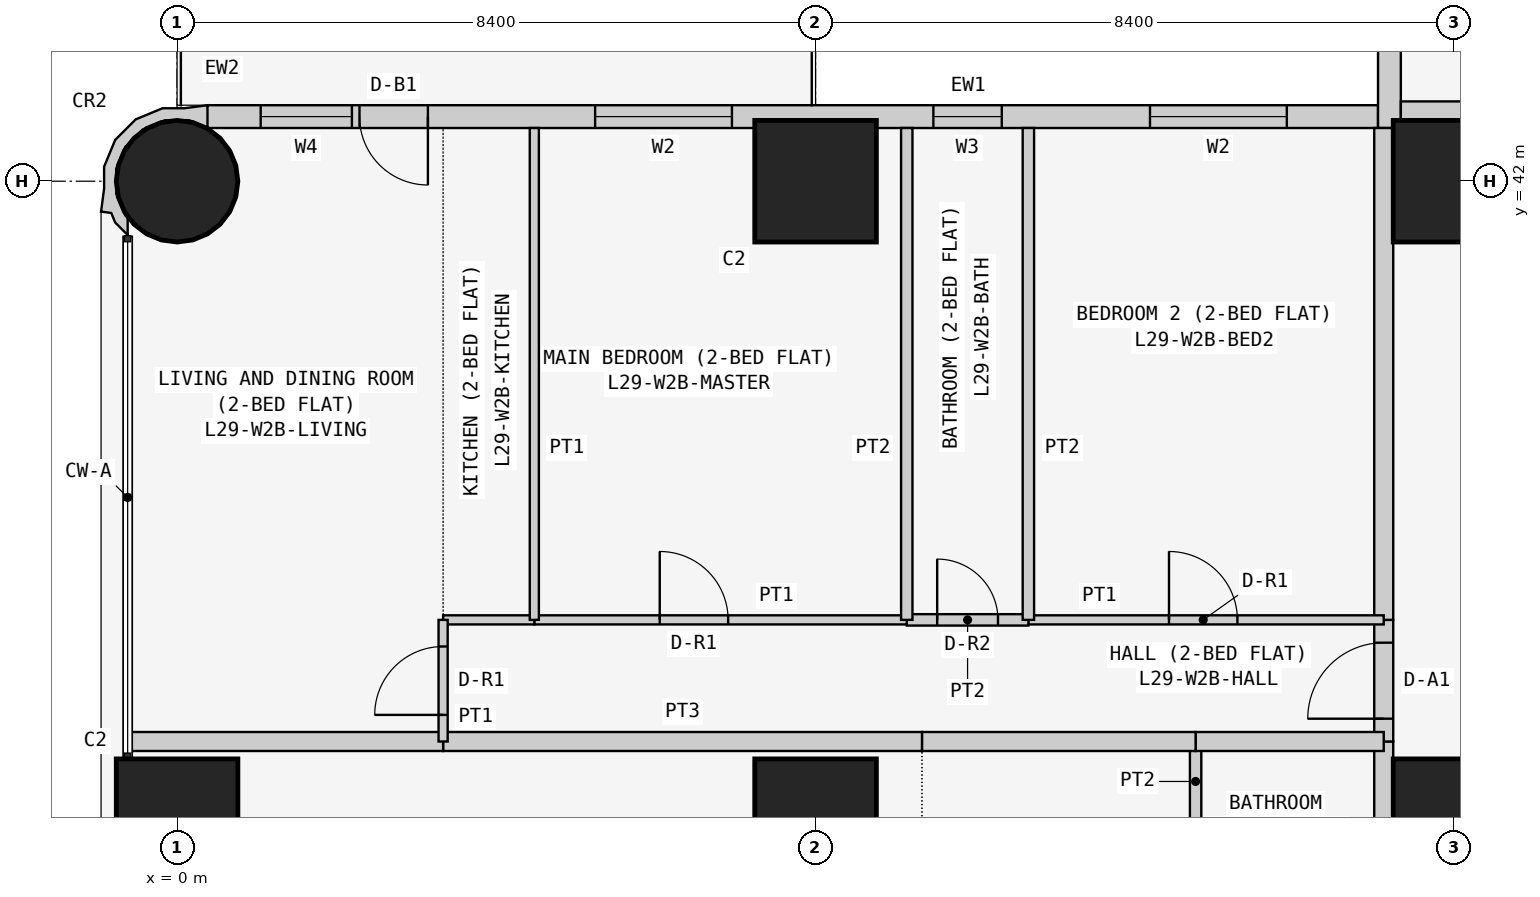
"""IFC4 building model, lengths in metres.
Left out: names, types, materials, properties, quantities, classifications, styles, units other than length and angle.
Written with IfcOpenShell. Run it as: python <this file> out.ifc"""

import sys

from ifc_helpers import new_model, si_unit, direction, frame, frame_2d, origin, origin_2d, place, context, subcontext, project, spatial, polyline, rectangle, circle, outline, extrude, element, fill, save


model = new_model("IFC4")
c1 = context("Model", 3, precision=1e-05, world=origin(), true_north=direction((0.0, 1.0)))
c2 = subcontext(c1, "Body", "Model", "MODEL_VIEW")
j1 = project(units=[si_unit("LENGTHUNIT", "METRE"), si_unit("PLANEANGLEUNIT", "RADIAN")], contexts=[c1])
p1 = place(None, origin())
s1 = spatial("IfcSite", under=j1, at=p1, CompositionType="ELEMENT")
p2 = place(p1, origin())
s2 = spatial("IfcBuilding", under=s1, at=p2, CompositionType="ELEMENT")
p3 = place(p2, frame((0.0, 0.0, 116.1)))
s3 = spatial("IfcBuildingStorey", under=s2, at=p3, CompositionType="ELEMENT", Elevation=116.1)
p4 = place(p3, frame((0.0, 33.6, 0.0), z_axis=(0.0, 0.0, 1.0), x_axis=(1.0, 0.0, 0.0)))
e1 = element("IfcColumn", 1, at=p4, inside=s3, PredefinedType="COLUMN", context=c2, shape_type="SweptSolid", body=[
    extrude(rectangle(XDim=1.6, YDim=1.6, at=origin_2d()), origin(), (0.0, 0.0, 1.0), 3.6),
])
p5 = place(p3, frame((0.0, 42.0, 0.0), z_axis=(0.0, 0.0, 1.0), x_axis=(1.0, 0.0, 0.0)))
e2 = element("IfcColumn", 2, at=p5, inside=s3, PredefinedType="COLUMN", context=c2, shape_type="SweptSolid", body=[
    extrude(circle(Radius=0.8, at=origin_2d()), origin(), (0.0, 0.0, 1.0), 3.6),
])
for number, where, z_axis, x_axis in (
    (3, (8.4, 33.6, 0.0), (0.0, 0.0, 1.0), (1.0, 0.0, 0.0)),
    (4, (8.4, 42.0, 0.0), (0.0, 0.0, 1.0), (1.0, 0.0, 0.0)),
    (5, (16.8, 33.6, 0.0), (0.0, 0.0, 1.0), (1.0, 0.0, 0.0)),
    (6, (16.8, 42.0, 0.0), (0.0, 0.0, 1.0), (1.0, 0.0, 0.0)),
):
    element("IfcColumn", number, at=place(p3, frame(where, z_axis=z_axis, x_axis=x_axis)), inside=s3, PredefinedType="COLUMN", context=c2, shape_type="SweptSolid", body=[
        extrude(rectangle(XDim=1.6, YDim=1.6, at=origin_2d()), origin(), (0.0, 0.0, 1.0), 3.6),
    ])
p6 = place(p3, frame((15.8, 42.85, 0.0), z_axis=(0.0, 0.0, 1.0), x_axis=(-1.0, 0.0, 0.0)))
e7 = element("IfcWall", 7, at=p6, inside=s3, PredefinedType="SOLIDWALL", context=c2, shape_type="SweptSolid", body=[
    extrude(rectangle(XDim=15.4, YDim=0.3, at=frame_2d((7.7, 0.0))), origin(), (0.0, 0.0, 1.0), 3.45),
])
p7 = place(p6, frame((1.2, 0.0, 0.9)))
e8 = element("IfcOpeningElement", 8, at=p7, cuts=e7, PredefinedType="OPENING", context=c2, shape_type="SweptSolid", body=[
    extrude(rectangle(XDim=1.8, YDim=1.5, at=frame_2d((0.9, 0.75))), frame((0.0, 0.16, 0.0), z_axis=(0.0, -1.0, 0.0), x_axis=(1.0, 0.0, 0.0)), (0.0, 0.0, 1.0), 0.32),
])
p8 = place(p6, frame((4.95, 0.0, 1.5)))
e9 = element("IfcOpeningElement", 9, at=p8, cuts=e7, PredefinedType="OPENING", context=c2, shape_type="SweptSolid", body=[
    extrude(rectangle(XDim=0.9, YDim=0.7, at=frame_2d((0.45, 0.35))), frame((0.0, 0.16, 0.0), z_axis=(0.0, -1.0, 0.0), x_axis=(1.0, 0.0, 0.0)), (0.0, 0.0, 1.0), 0.32),
])
p9 = place(p6, frame((8.5, 0.0, 0.9)))
e10 = element("IfcOpeningElement", 10, at=p9, cuts=e7, PredefinedType="OPENING", context=c2, shape_type="SweptSolid", body=[
    extrude(rectangle(XDim=1.8, YDim=1.5, at=frame_2d((0.9, 0.75))), frame((0.0, 0.16, 0.0), z_axis=(0.0, -1.0, 0.0), x_axis=(1.0, 0.0, 0.0)), (0.0, 0.0, 1.0), 0.32),
])
p10 = place(p6, frame((12.5, 0.0, 0.0)))
e11 = element("IfcOpeningElement", 11, at=p10, cuts=e7, PredefinedType="OPENING", context=c2, shape_type="SweptSolid", body=[
    extrude(rectangle(XDim=0.9, YDim=2.4, at=frame_2d((0.45, 1.2))), frame((0.0, 0.16, 0.0), z_axis=(0.0, -1.0, 0.0), x_axis=(1.0, 0.0, 0.0)), (0.0, 0.0, 1.0), 0.32),
])
p11 = place(p6, frame((13.5, 0.0, 0.9)))
e12 = element("IfcOpeningElement", 12, at=p11, cuts=e7, PredefinedType="OPENING", context=c2, shape_type="SweptSolid", body=[
    extrude(rectangle(XDim=1.2, YDim=1.5, at=frame_2d((0.6, 0.75))), frame((0.0, 0.16, 0.0), z_axis=(0.0, -1.0, 0.0), x_axis=(1.0, 0.0, 0.0)), (0.0, 0.0, 1.0), 0.32),
])
p12 = place(p3, frame((15.95, 50.0, 0.0), z_axis=(0.0, 0.0, 1.0), x_axis=(0.0, -1.0, 0.0)))
e13 = element("IfcWall", 13, at=p12, inside=s3, PredefinedType="SOLIDWALL", context=c2, shape_type="SweptSolid", body=[
    extrude(rectangle(XDim=7.3, YDim=0.3, at=frame_2d((3.65, 0.0))), origin(), (0.0, 0.0, 1.0), 3.45),
])
p13 = place(p12, frame((3.1, 0.0, 0.9)))
e14 = element("IfcOpeningElement", 14, at=p13, cuts=e13, PredefinedType="OPENING", context=c2, shape_type="SweptSolid", body=[
    extrude(rectangle(XDim=2.4, YDim=1.5, at=frame_2d((1.2, 0.75))), frame((0.0, 0.16, 0.0), z_axis=(0.0, -1.0, 0.0), x_axis=(1.0, 0.0, 0.0)), (0.0, 0.0, 1.0), 0.32),
])
p14 = place(p12, frame((0.75, 0.0, 0.9)))
e15 = element("IfcOpeningElement", 15, at=p14, cuts=e13, PredefinedType="OPENING", context=c2, shape_type="SweptSolid", body=[
    extrude(rectangle(XDim=1.2, YDim=1.5, at=frame_2d((0.6, 0.75))), frame((0.0, 0.16, 0.0), z_axis=(0.0, -1.0, 0.0), x_axis=(1.0, 0.0, 0.0)), (0.0, 0.0, 1.0), 0.32),
])
p15 = place(p3, frame((0.327, 42.817, 0.0), z_axis=(0.0, 0.0, 1.0), x_axis=(-0.93923434088, 0.343276641956, 0.0)))
e16 = element("IfcWall", 16, at=p15, inside=s3, PredefinedType="SOLIDWALL", context=c2, shape_type="SweptSolid", body=[
    extrude(outline(polyline([(-0.006, -0.197), (0.266, -0.055), (0.535, 0.044), (0.816, 0.302), (0.977, 0.648), (0.994, 1.03), (0.895, 1.299), (0.828, 1.598), (0.697, 1.569), (0.604, 1.67), (0.394, 1.767), (0.471, 1.556), (0.509, 1.539), (0.724, 1.304), (0.833, 1.005), (0.82, 0.687), (0.686, 0.397), (0.451, 0.182), (0.152, 0.073), (-0.116, 0.084), (-0.127, 0.078), (-0.146, 0.071), (-0.006, -0.197)])), origin(), (0.0, 0.0, 1.0), 3.45),
])
p16 = place(p3, frame((16.1, 42.925, 0.0), z_axis=(0.0, 0.0, 1.0), x_axis=(1.0, 0.0, 0.0)))
e17 = element("IfcWall", 17, at=p16, inside=s3, PredefinedType="PARTITIONING", context=c2, shape_type="SweptSolid", body=[
    extrude(rectangle(XDim=6.871, YDim=0.25, at=frame_2d((3.436, 0.0))), origin(), (0.0, 0.0, 1.0), 3.45),
])
p17 = place(p3, frame((15.875, 32.0, 0.0), z_axis=(0.0, 0.0, 1.0), x_axis=(0.0, 1.0, 0.0)))
e18 = element("IfcWall", 18, at=p17, inside=s3, PredefinedType="PARTITIONING", context=c2, shape_type="SweptSolid", body=[
    extrude(rectangle(XDim=2.629, YDim=0.25, at=frame_2d((1.314, 0.0))), origin(), (0.0, 0.0, 1.0), 3.45),
])
p18 = place(p3, frame((15.875, 34.629, 0.0), z_axis=(0.0, 0.0, 1.0), x_axis=(0.0, 1.0, 0.0)))
e19 = element("IfcWall", 19, at=p18, inside=s3, PredefinedType="PARTITIONING", context=c2, shape_type="SweptSolid", body=[
    extrude(rectangle(XDim=1.6, YDim=0.25, at=frame_2d((0.8, 0.0))), origin(), (0.0, 0.0, 1.0), 3.45),
])
p19 = place(p18, frame((0.3, 0.0, 0.0)))
e20 = element("IfcOpeningElement", 20, at=p19, cuts=e19, PredefinedType="OPENING", context=c2, shape_type="SweptSolid", body=[
    extrude(rectangle(XDim=1.0, YDim=2.1, at=frame_2d((0.5, 1.05))), frame((0.0, 0.135, 0.0), z_axis=(0.0, -1.0, 0.0), x_axis=(1.0, 0.0, 0.0)), (0.0, 0.0, 1.0), 0.27),
])
p20 = place(p3, frame((15.875, 36.229, 0.0), z_axis=(0.0, 0.0, 1.0), x_axis=(0.0, 1.0, 0.0)))
e21 = element("IfcWall", 21, at=p20, inside=s3, PredefinedType="PARTITIONING", context=c2, shape_type="SweptSolid", body=[
    extrude(rectangle(XDim=6.471, YDim=0.25, at=frame_2d((3.235, 0.0))), origin(), (0.0, 0.0, 1.0), 3.45),
])
p21 = place(p3, frame((13.4, 32.0, 0.0), z_axis=(0.0, 0.0, 1.0), x_axis=(0.0, 1.0, 0.0)))
e22 = element("IfcWall", 22, at=p21, inside=s3, PredefinedType="PARTITIONING", context=c2, shape_type="SweptSolid", body=[
    extrude(rectangle(XDim=2.629, YDim=0.15, at=frame_2d((1.314, 0.0))), origin(), (0.0, 0.0, 1.0), 3.45),
])
p22 = place(p3, frame((13.4, 34.629, 0.0), z_axis=(0.0, 0.0, 1.0), x_axis=(1.0, 0.0, 0.0)))
e23 = element("IfcWall", 23, at=p22, inside=s3, PredefinedType="PARTITIONING", context=c2, shape_type="SweptSolid", body=[
    extrude(rectangle(XDim=2.475, YDim=0.25, at=frame_2d((1.238, 0.0))), origin(), (0.0, 0.0, 1.0), 3.45),
])
p23 = place(p3, frame((9.8, 34.629, 0.0), z_axis=(0.0, 0.0, 1.0), x_axis=(1.0, 0.0, 0.0)))
e24 = element("IfcWall", 24, at=p23, inside=s3, PredefinedType="PARTITIONING", context=c2, shape_type="SweptSolid", body=[
    extrude(rectangle(XDim=3.6, YDim=0.25, at=frame_2d((1.8, 0.0))), origin(), (0.0, 0.0, 1.0), 3.45),
])
p24 = place(p3, frame((3.5, 34.629, 0.0), z_axis=(0.0, 0.0, 1.0), x_axis=(1.0, 0.0, 0.0)))
e25 = element("IfcWall", 25, at=p24, inside=s3, PredefinedType="PARTITIONING", context=c2, shape_type="SweptSolid", body=[
    extrude(rectangle(XDim=6.3, YDim=0.25, at=frame_2d((3.15, 0.0))), origin(), (0.0, 0.0, 1.0), 3.45),
])
p25 = place(p3, frame((-0.65, 34.629, 0.0), z_axis=(0.0, 0.0, 1.0), x_axis=(1.0, 0.0, 0.0)))
e26 = element("IfcWall", 26, at=p25, inside=s3, PredefinedType="PARTITIONING", context=c2, shape_type="SweptSolid", body=[
    extrude(rectangle(XDim=4.15, YDim=0.25, at=frame_2d((2.075, 0.0))), origin(), (0.0, 0.0, 1.0), 3.45),
])
p26 = place(p3, frame((11.2, 36.229, 0.0), z_axis=(0.0, 0.0, 1.0), x_axis=(1.0, 0.0, 0.0)))
e27 = element("IfcWall", 27, at=p26, inside=s3, PredefinedType="PARTITIONING", context=c2, shape_type="SweptSolid", body=[
    extrude(rectangle(XDim=4.675, YDim=0.12, at=frame_2d((2.337, 0.0))), origin(), (0.0, 0.0, 1.0), 3.45),
])
p27 = place(p26, frame((1.85, 0.0, 0.0)))
e28 = element("IfcOpeningElement", 28, at=p27, cuts=e27, PredefinedType="OPENING", context=c2, shape_type="SweptSolid", body=[
    extrude(rectangle(XDim=0.9, YDim=2.1, at=frame_2d((0.45, 1.05))), frame((0.0, 0.07, 0.0), z_axis=(0.0, -1.0, 0.0), x_axis=(1.0, 0.0, 0.0)), (0.0, 0.0, 1.0), 0.14),
])
p28 = place(p3, frame((9.6, 36.229, 0.0), z_axis=(0.0, 0.0, 1.0), x_axis=(1.0, 0.0, 0.0)))
e29 = element("IfcWall", 29, at=p28, inside=s3, PredefinedType="PARTITIONING", context=c2, shape_type="SweptSolid", body=[
    extrude(rectangle(XDim=1.6, YDim=0.15, at=frame_2d((0.8, 0.0))), origin(), (0.0, 0.0, 1.0), 3.45),
])
p29 = place(p28, frame((0.4, 0.0, 0.0)))
e30 = element("IfcOpeningElement", 30, at=p29, cuts=e29, PredefinedType="OPENING", context=c2, shape_type="SweptSolid", body=[
    extrude(rectangle(XDim=0.8, YDim=2.1, at=frame_2d((0.4, 1.05))), frame((0.0, 0.085, 0.0), z_axis=(0.0, -1.0, 0.0), x_axis=(1.0, 0.0, 0.0)), (0.0, 0.0, 1.0), 0.17),
])
p30 = place(p3, frame((4.7, 36.229, 0.0), z_axis=(0.0, 0.0, 1.0), x_axis=(1.0, 0.0, 0.0)))
e31 = element("IfcWall", 31, at=p30, inside=s3, PredefinedType="PARTITIONING", context=c2, shape_type="SweptSolid", body=[
    extrude(rectangle(XDim=4.9, YDim=0.12, at=frame_2d((2.45, 0.0))), origin(), (0.0, 0.0, 1.0), 3.45),
])
p31 = place(p30, frame((1.65, 0.0, 0.0)))
e32 = element("IfcOpeningElement", 32, at=p31, cuts=e31, PredefinedType="OPENING", context=c2, shape_type="SweptSolid", body=[
    extrude(rectangle(XDim=0.9, YDim=2.1, at=frame_2d((0.45, 1.05))), frame((0.0, 0.07, 0.0), z_axis=(0.0, -1.0, 0.0), x_axis=(1.0, 0.0, 0.0)), (0.0, 0.0, 1.0), 0.14),
])
p32 = place(p3, frame((3.5, 36.229, 0.0), z_axis=(0.0, 0.0, 1.0), x_axis=(1.0, 0.0, 0.0)))
e33 = element("IfcWall", 33, at=p32, inside=s3, PredefinedType="PARTITIONING", context=c2, shape_type="SweptSolid", body=[
    extrude(rectangle(XDim=1.2, YDim=0.12, at=frame_2d((0.6, 0.0))), origin(), (0.0, 0.0, 1.0), 3.45),
])
p33 = place(p3, frame((3.5, 34.629, 0.0), z_axis=(0.0, 0.0, 1.0), x_axis=(0.0, 1.0, 0.0)))
e34 = element("IfcWall", 34, at=p33, inside=s3, PredefinedType="PARTITIONING", context=c2, shape_type="SweptSolid", body=[
    extrude(rectangle(XDim=1.6, YDim=0.12, at=frame_2d((0.8, 0.0))), origin(), (0.0, 0.0, 1.0), 3.45),
])
p34 = place(p33, frame((0.35, 0.0, 0.0)))
e35 = element("IfcOpeningElement", 35, at=p34, cuts=e34, PredefinedType="OPENING", context=c2, shape_type="SweptSolid", body=[
    extrude(rectangle(XDim=0.9, YDim=2.1, at=frame_2d((0.45, 1.05))), frame((0.0, 0.07, 0.0), z_axis=(0.0, -1.0, 0.0), x_axis=(1.0, 0.0, 0.0)), (0.0, 0.0, 1.0), 0.14),
])
for number, where, z_axis, x_axis in (
    (36, (11.2, 36.229, 0.0), (0.0, 0.0, 1.0), (0.0, 1.0, 0.0)),
    (37, (9.6, 36.229, 0.0), (0.0, 0.0, 1.0), (0.0, 1.0, 0.0)),
):
    element("IfcWall", number, at=place(p3, frame(where, z_axis=z_axis, x_axis=x_axis)), inside=s3, PredefinedType="PARTITIONING", context=c2, shape_type="SweptSolid", body=[
        extrude(rectangle(XDim=6.471, YDim=0.15, at=frame_2d((3.235, 0.0))), origin(), (0.0, 0.0, 1.0), 3.45),
    ])
p35 = place(p3, frame((4.7, 36.229, 0.0), z_axis=(0.0, 0.0, 1.0), x_axis=(0.0, 1.0, 0.0)))
e38 = element("IfcWall", 38, at=p35, inside=s3, PredefinedType="PARTITIONING", context=c2, shape_type="SweptSolid", body=[
    extrude(rectangle(XDim=6.471, YDim=0.12, at=frame_2d((3.235, 0.0))), origin(), (0.0, 0.0, 1.0), 3.45),
])
p36 = place(p7, origin())
e39 = element("IfcWindow", 39, at=p36, inside=s3, PartitioningType="SINGLE_PANEL", PredefinedType="WINDOW", context=c2, shape_type="SweptSolid", body=[
    extrude(rectangle(XDim=1.8, YDim=1.5, at=frame_2d((0.9, 0.75))), frame((0.0, 0.03, 0.0), z_axis=(0.0, -1.0, 0.0), x_axis=(1.0, 0.0, 0.0)), (0.0, 0.0, 1.0), 0.06),
])
fill(e8, e39)
p37 = place(p8, origin())
e40 = element("IfcWindow", 40, at=p37, inside=s3, PartitioningType="SINGLE_PANEL", PredefinedType="WINDOW", context=c2, shape_type="SweptSolid", body=[
    extrude(rectangle(XDim=0.9, YDim=0.7, at=frame_2d((0.45, 0.35))), frame((0.0, 0.03, 0.0), z_axis=(0.0, -1.0, 0.0), x_axis=(1.0, 0.0, 0.0)), (0.0, 0.0, 1.0), 0.06),
])
fill(e9, e40)
p38 = place(p9, origin())
e41 = element("IfcWindow", 41, at=p38, inside=s3, PartitioningType="SINGLE_PANEL", PredefinedType="WINDOW", context=c2, shape_type="SweptSolid", body=[
    extrude(rectangle(XDim=1.8, YDim=1.5, at=frame_2d((0.9, 0.75))), frame((0.0, 0.03, 0.0), z_axis=(0.0, -1.0, 0.0), x_axis=(1.0, 0.0, 0.0)), (0.0, 0.0, 1.0), 0.06),
])
fill(e10, e41)
p39 = place(p10, origin())
e42 = element("IfcDoor", 42, at=p39, inside=s3, OperationType="SINGLE_SWING_LEFT", PredefinedType="DOOR", context=c2, shape_type="SweptSolid", body=[
    extrude(rectangle(XDim=0.9, YDim=2.4, at=frame_2d((0.45, 1.2))), frame((0.0, 0.025, 0.0), z_axis=(0.0, -1.0, 0.0), x_axis=(1.0, 0.0, 0.0)), (0.0, 0.0, 1.0), 0.05),
])
fill(e11, e42)
p40 = place(p11, origin())
e43 = element("IfcWindow", 43, at=p40, inside=s3, PartitioningType="SINGLE_PANEL", PredefinedType="WINDOW", context=c2, shape_type="SweptSolid", body=[
    extrude(rectangle(XDim=1.2, YDim=1.5, at=frame_2d((0.6, 0.75))), frame((0.0, 0.03, 0.0), z_axis=(0.0, -1.0, 0.0), x_axis=(1.0, 0.0, 0.0)), (0.0, 0.0, 1.0), 0.06),
])
fill(e12, e43)
p41 = place(p19, origin())
e44 = element("IfcDoor", 44, at=p41, inside=s3, OperationType="SINGLE_SWING_LEFT", PredefinedType="DOOR", context=c2, shape_type="SweptSolid", body=[
    extrude(rectangle(XDim=1.0, YDim=2.1, at=frame_2d((0.5, 1.05))), frame((0.0, 0.025, 0.0), z_axis=(0.0, -1.0, 0.0), x_axis=(1.0, 0.0, 0.0)), (0.0, 0.0, 1.0), 0.05),
])
fill(e20, e44)
p42 = place(p27, origin())
e45 = element("IfcDoor", 45, at=p42, inside=s3, OperationType="SINGLE_SWING_LEFT", PredefinedType="DOOR", context=c2, shape_type="SweptSolid", body=[
    extrude(rectangle(XDim=0.9, YDim=2.1, at=frame_2d((0.45, 1.05))), frame((0.0, 0.025, 0.0), z_axis=(0.0, -1.0, 0.0), x_axis=(1.0, 0.0, 0.0)), (0.0, 0.0, 1.0), 0.05),
])
fill(e28, e45)
p43 = place(p29, origin())
e46 = element("IfcDoor", 46, at=p43, inside=s3, OperationType="SINGLE_SWING_LEFT", PredefinedType="DOOR", context=c2, shape_type="SweptSolid", body=[
    extrude(rectangle(XDim=0.8, YDim=2.1, at=frame_2d((0.4, 1.05))), frame((0.0, 0.025, 0.0), z_axis=(0.0, -1.0, 0.0), x_axis=(1.0, 0.0, 0.0)), (0.0, 0.0, 1.0), 0.05),
])
fill(e30, e46)
p44 = place(p31, origin())
e47 = element("IfcDoor", 47, at=p44, inside=s3, OperationType="SINGLE_SWING_LEFT", PredefinedType="DOOR", context=c2, shape_type="SweptSolid", body=[
    extrude(rectangle(XDim=0.9, YDim=2.1, at=frame_2d((0.45, 1.05))), frame((0.0, 0.025, 0.0), z_axis=(0.0, -1.0, 0.0), x_axis=(1.0, 0.0, 0.0)), (0.0, 0.0, 1.0), 0.05),
])
fill(e32, e47)
p45 = place(p34, origin())
e48 = element("IfcDoor", 48, at=p45, inside=s3, OperationType="SINGLE_SWING_LEFT", PredefinedType="DOOR", context=c2, shape_type="SweptSolid", body=[
    extrude(rectangle(XDim=0.9, YDim=2.1, at=frame_2d((0.45, 1.05))), frame((0.0, 0.025, 0.0), z_axis=(0.0, -1.0, 0.0), x_axis=(1.0, 0.0, 0.0)), (0.0, 0.0, 1.0), 0.05),
])
fill(e35, e48)
save(model, sys.argv[1])
